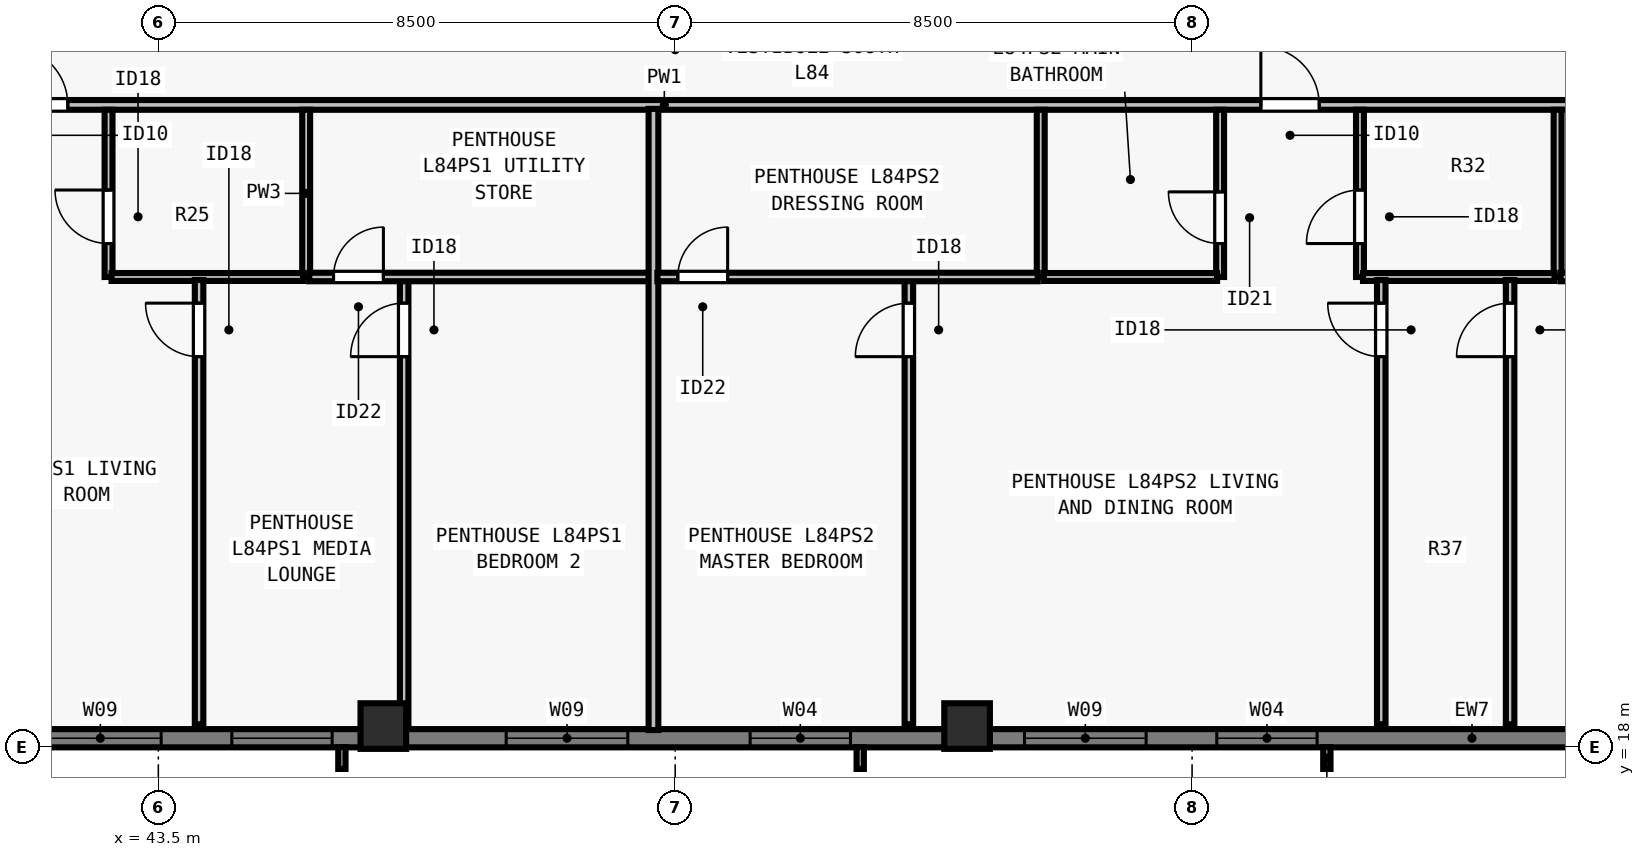
"""IFC4 building model, lengths in metres.
Left out: names, types, materials, properties, quantities, classifications, styles, units other than length and angle.
Written with IfcOpenShell. Run it as: python <this file> out.ifc"""

import sys

from ifc_helpers import new_model, si_unit, direction, frame, frame_2d, origin, origin_2d, place, context, subcontext, project, spatial, rectangle, extrude, element, fill, save


model = new_model("IFC4")
c1 = context("Model", 3, precision=1e-05, world=origin(), true_north=direction((0.0, 1.0)))
c2 = subcontext(c1, "Body", "Model", "MODEL_VIEW")
j1 = project(units=[si_unit("LENGTHUNIT", "METRE"), si_unit("PLANEANGLEUNIT", "RADIAN")], contexts=[c1])
p1 = place(None, origin())
s1 = spatial("IfcSite", under=j1, at=p1, CompositionType="ELEMENT")
p2 = place(p1, origin())
s2 = spatial("IfcBuilding", under=s1, at=p2, CompositionType="ELEMENT")
p3 = place(p2, frame((0.0, 0.0, 305.0)))
s3 = spatial("IfcBuildingStorey", under=s2, at=p3, CompositionType="ELEMENT", Elevation=305.0)
for number, where, z_axis, x_axis in (
    (1, (47.2, 18.35, 0.0), (0.0, 0.0, 1.0), (1.0, 0.0, 0.0)),
    (2, (56.8, 18.35, 0.0), (0.0, 0.0, 1.0), (1.0, 0.0, 0.0)),
):
    element("IfcColumn", number, at=place(p3, frame(where, z_axis=z_axis, x_axis=x_axis)), inside=s3, PredefinedType="COLUMN", context=c2, shape_type="SweptSolid", body=[
        extrude(rectangle(XDim=0.75, YDim=0.75, at=origin_2d()), origin(), (0.0, 0.0, 1.0), 3.5),
    ])
p4 = place(p3, frame((67.5, 18.15, 0.0), z_axis=(0.0, 0.0, 1.0), x_axis=(-1.0, 0.0, 0.0)))
e3 = element("IfcWall", 3, at=p4, inside=s3, PredefinedType="SOLIDWALL", context=c2, shape_type="SweptSolid", body=[
    extrude(rectangle(XDim=30.722, YDim=0.3, at=frame_2d((15.361, 0.0))), origin(), (0.0, 0.0, 1.0), 3.29),
])
p5 = place(p4, frame((4.944, 0.0, 0.8)))
e4 = element("IfcOpeningElement", 4, at=p5, cuts=e3, PredefinedType="OPENING", context=c2, shape_type="SweptSolid", body=[
    extrude(rectangle(XDim=1.65, YDim=1.758, at=frame_2d((0.825, 0.879))), frame((0.0, 0.16, 0.0), z_axis=(0.0, -1.0, 0.0), x_axis=(1.0, 0.0, 0.0)), (0.0, 0.0, 1.0), 0.32),
])
p6 = place(p4, frame((7.756, 0.0, 0.8)))
e5 = element("IfcOpeningElement", 5, at=p6, cuts=e3, PredefinedType="OPENING", context=c2, shape_type="SweptSolid", body=[
    extrude(rectangle(XDim=2.0, YDim=1.758, at=frame_2d((1.0, 0.879))), frame((0.0, 0.16, 0.0), z_axis=(0.0, -1.0, 0.0), x_axis=(1.0, 0.0, 0.0)), (0.0, 0.0, 1.0), 0.32),
])
p7 = place(p4, frame((12.617, 0.0, 0.8)))
e6 = element("IfcOpeningElement", 6, at=p7, cuts=e3, PredefinedType="OPENING", context=c2, shape_type="SweptSolid", body=[
    extrude(rectangle(XDim=1.65, YDim=1.758, at=frame_2d((0.825, 0.879))), frame((0.0, 0.16, 0.0), z_axis=(0.0, -1.0, 0.0), x_axis=(1.0, 0.0, 0.0)), (0.0, 0.0, 1.0), 0.32),
])
p8 = place(p4, frame((16.28, 0.0, 0.8)))
e7 = element("IfcOpeningElement", 7, at=p8, cuts=e3, PredefinedType="OPENING", context=c2, shape_type="SweptSolid", body=[
    extrude(rectangle(XDim=2.0, YDim=1.758, at=frame_2d((1.0, 0.879))), frame((0.0, 0.16, 0.0), z_axis=(0.0, -1.0, 0.0), x_axis=(1.0, 0.0, 0.0)), (0.0, 0.0, 1.0), 0.32),
])
p9 = place(p4, frame((21.142, 0.0, 0.8)))
e8 = element("IfcOpeningElement", 8, at=p9, cuts=e3, PredefinedType="OPENING", context=c2, shape_type="SweptSolid", body=[
    extrude(rectangle(XDim=1.65, YDim=1.758, at=frame_2d((0.825, 0.879))), frame((0.0, 0.16, 0.0), z_axis=(0.0, -1.0, 0.0), x_axis=(1.0, 0.0, 0.0)), (0.0, 0.0, 1.0), 0.32),
])
p10 = place(p4, frame((23.954, 0.0, 0.8)))
e9 = element("IfcOpeningElement", 9, at=p10, cuts=e3, PredefinedType="OPENING", context=c2, shape_type="SweptSolid", body=[
    extrude(rectangle(XDim=2.0, YDim=1.758, at=frame_2d((1.0, 0.879))), frame((0.0, 0.16, 0.0), z_axis=(0.0, -1.0, 0.0), x_axis=(1.0, 0.0, 0.0)), (0.0, 0.0, 1.0), 0.32),
])
p11 = place(p3, frame((31.285, 28.565, 0.0), z_axis=(0.0, 0.0, 1.0), x_axis=(1.0, 0.0, 0.0)))
e10 = element("IfcWall", 10, at=p11, inside=s3, PredefinedType="PARTITIONING", context=c2, shape_type="SweptSolid", body=[
    extrude(rectangle(XDim=41.43, YDim=0.16, at=frame_2d((20.715, 0.0))), origin(), (0.0, 0.0, 1.0), 3.009),
])
p12 = place(p11, frame((9.766, 0.0, 0.0)))
e11 = element("IfcOpeningElement", 11, at=p12, cuts=e10, PredefinedType="OPENING", context=c2, shape_type="SweptSolid", body=[
    extrude(rectangle(XDim=0.96, YDim=2.18, at=frame_2d((0.48, 1.09))), frame((0.0, 0.09, 0.0), z_axis=(0.0, -1.0, 0.0), x_axis=(1.0, 0.0, 0.0)), (0.0, 0.0, 1.0), 0.18),
])
p13 = place(p11, frame((30.346, 0.0, 0.0)))
e12 = element("IfcOpeningElement", 12, at=p13, cuts=e10, PredefinedType="OPENING", context=c2, shape_type="SweptSolid", body=[
    extrude(rectangle(XDim=0.96, YDim=2.18, at=frame_2d((0.48, 1.09))), frame((0.0, 0.09, 0.0), z_axis=(0.0, -1.0, 0.0), x_axis=(1.0, 0.0, 0.0)), (0.0, 0.0, 1.0), 0.18),
])
p14 = place(p3, frame((45.931, 25.735, 0.0), z_axis=(0.0, 0.0, 1.0), x_axis=(0.0, 1.0, 0.0)))
e13 = element("IfcWall", 13, at=p14, inside=s3, PredefinedType="PLUMBINGWALL", context=c2, shape_type="SweptSolid", body=[
    extrude(rectangle(XDim=2.75, YDim=0.13, at=frame_2d((1.375, 0.0))), origin(), (0.0, 0.0, 1.0), 3.29),
])
p15 = place(p3, frame((42.681, 25.735, 0.0), z_axis=(0.0, 0.0, 1.0), x_axis=(0.0, 1.0, 0.0)))
e14 = element("IfcWall", 14, at=p15, inside=s3, PredefinedType="PLUMBINGWALL", context=c2, shape_type="SweptSolid", body=[
    extrude(rectangle(XDim=2.75, YDim=0.13, at=frame_2d((1.375, 0.0))), origin(), (0.0, 0.0, 1.0), 3.29),
])
p16 = place(p15, frame((0.55, 0.0, 0.0)))
e15 = element("IfcOpeningElement", 15, at=p16, cuts=e14, PredefinedType="OPENING", context=c2, shape_type="SweptSolid", body=[
    extrude(rectangle(XDim=0.88, YDim=2.1, at=frame_2d((0.44, 1.05))), frame((0.0, 0.075, 0.0), z_axis=(0.0, -1.0, 0.0), x_axis=(1.0, 0.0, 0.0)), (0.0, 0.0, 1.0), 0.15),
])
p17 = place(p3, frame((42.731, 25.735, 0.0), z_axis=(0.0, 0.0, 1.0), x_axis=(1.0, 0.0, 0.0)))
e16 = element("IfcWall", 16, at=p17, inside=s3, PredefinedType="PLUMBINGWALL", context=c2, shape_type="SweptSolid", body=[
    extrude(rectangle(XDim=3.15, YDim=0.13, at=frame_2d((1.575, 0.0))), origin(), (0.0, 0.0, 1.0), 3.29),
])
p18 = place(p3, frame((47.542, 18.38, 0.0), z_axis=(0.0, 0.0, 1.0), x_axis=(0.0, 1.0, 0.0)))
e17 = element("IfcWall", 17, at=p18, inside=s3, PredefinedType="PARTITIONING", context=c2, shape_type="SweptSolid", body=[
    extrude(rectangle(XDim=7.395, YDim=0.14, at=frame_2d((3.698, 0.0))), origin(), (0.0, 0.0, 1.0), 3.009),
])
p19 = place(p18, frame((6.045, 0.0, 0.0)))
e18 = element("IfcOpeningElement", 18, at=p19, cuts=e17, PredefinedType="OPENING", context=c2, shape_type="SweptSolid", body=[
    extrude(rectangle(XDim=0.88, YDim=2.1, at=frame_2d((0.44, 1.05))), frame((0.0, 0.08, 0.0), z_axis=(0.0, -1.0, 0.0), x_axis=(1.0, 0.0, 0.0)), (0.0, 0.0, 1.0), 0.16),
])
p20 = place(p3, frame((45.981, 25.735, 0.0), z_axis=(0.0, 0.0, 1.0), x_axis=(1.0, 0.0, 0.0)))
e19 = element("IfcWall", 19, at=p20, inside=s3, PredefinedType="PARTITIONING", context=c2, shape_type="SweptSolid", body=[
    extrude(rectangle(XDim=5.711, YDim=0.14, at=frame_2d((2.855, 0.0))), origin(), (0.0, 0.0, 1.0), 3.29),
])
p21 = place(p20, frame((0.4, 0.0, 0.0)))
e20 = element("IfcOpeningElement", 20, at=p21, cuts=e19, PredefinedType="OPENING", context=c2, shape_type="SweptSolid", body=[
    extrude(rectangle(XDim=0.82, YDim=2.1, at=frame_2d((0.41, 1.05))), frame((0.0, 0.08, 0.0), z_axis=(0.0, -1.0, 0.0), x_axis=(1.0, 0.0, 0.0)), (0.0, 0.0, 1.0), 0.16),
])
p22 = place(p3, frame((44.17, 18.38, 0.0), z_axis=(0.0, 0.0, 1.0), x_axis=(0.0, 1.0, 0.0)))
e21 = element("IfcWall", 21, at=p22, inside=s3, PredefinedType="PARTITIONING", context=c2, shape_type="SweptSolid", body=[
    extrude(rectangle(XDim=7.305, YDim=0.14, at=frame_2d((3.653, 0.0))), origin(), (0.0, 0.0, 1.0), 3.29),
])
p23 = place(p22, frame((6.045, 0.0, 0.0)))
e22 = element("IfcOpeningElement", 22, at=p23, cuts=e21, PredefinedType="OPENING", context=c2, shape_type="SweptSolid", body=[
    extrude(rectangle(XDim=0.88, YDim=2.1, at=frame_2d((0.44, 1.05))), frame((0.0, 0.08, 0.0), z_axis=(0.0, -1.0, 0.0), x_axis=(1.0, 0.0, 0.0)), (0.0, 0.0, 1.0), 0.16),
])
p24 = place(p3, frame((51.643, 18.285, 0.0), z_axis=(0.0, 0.0, 1.0), x_axis=(0.0, 1.0, 0.0)))
e23 = element("IfcWall", 23, at=p24, inside=s3, PredefinedType="PARTITIONING", context=c2, shape_type="SweptSolid", body=[
    extrude(rectangle(XDim=10.215, YDim=0.16, at=frame_2d((5.107, 0.0))), origin(), (0.0, 0.0, 1.0), 3.009),
])
p25 = place(p3, frame((58.011, 25.735, 0.0), z_axis=(0.0, 0.0, 1.0), x_axis=(0.0, 1.0, 0.0)))
e24 = element("IfcWall", 24, at=p25, inside=s3, PredefinedType="PLUMBINGWALL", context=c2, shape_type="SweptSolid", body=[
    extrude(rectangle(XDim=2.75, YDim=0.13, at=frame_2d((1.375, 0.0))), origin(), (0.0, 0.0, 1.0), 3.29),
])
p26 = place(p3, frame((60.961, 25.735, 0.0), z_axis=(0.0, 0.0, 1.0), x_axis=(0.0, 1.0, 0.0)))
e25 = element("IfcWall", 25, at=p26, inside=s3, PredefinedType="PLUMBINGWALL", context=c2, shape_type="SweptSolid", body=[
    extrude(rectangle(XDim=2.75, YDim=0.13, at=frame_2d((1.375, 0.0))), origin(), (0.0, 0.0, 1.0), 3.29),
])
p27 = place(p26, frame((0.55, 0.0, 0.0)))
e26 = element("IfcOpeningElement", 26, at=p27, cuts=e25, PredefinedType="OPENING", context=c2, shape_type="SweptSolid", body=[
    extrude(rectangle(XDim=0.85, YDim=2.08, at=frame_2d((0.425, 1.04))), frame((0.0, 0.075, 0.0), z_axis=(0.0, -1.0, 0.0), x_axis=(1.0, 0.0, 0.0)), (0.0, 0.0, 1.0), 0.15),
])
p28 = place(p3, frame((58.061, 25.735, 0.0), z_axis=(0.0, 0.0, 1.0), x_axis=(1.0, 0.0, 0.0)))
e27 = element("IfcWall", 27, at=p28, inside=s3, PredefinedType="PLUMBINGWALL", context=c2, shape_type="SweptSolid", body=[
    extrude(rectangle(XDim=2.85, YDim=0.13, at=frame_2d((1.425, 0.0))), origin(), (0.0, 0.0, 1.0), 3.29),
])
p29 = place(p3, frame((66.511, 25.735, 0.0), z_axis=(0.0, 0.0, 1.0), x_axis=(0.0, 1.0, 0.0)))
e28 = element("IfcWall", 28, at=p29, inside=s3, PredefinedType="PLUMBINGWALL", context=c2, shape_type="SweptSolid", body=[
    extrude(rectangle(XDim=2.75, YDim=0.13, at=frame_2d((1.375, 0.0))), origin(), (0.0, 0.0, 1.0), 3.29),
])
p30 = place(p3, frame((63.261, 25.735, 0.0), z_axis=(0.0, 0.0, 1.0), x_axis=(0.0, 1.0, 0.0)))
e29 = element("IfcWall", 29, at=p30, inside=s3, PredefinedType="PLUMBINGWALL", context=c2, shape_type="SweptSolid", body=[
    extrude(rectangle(XDim=2.75, YDim=0.13, at=frame_2d((1.375, 0.0))), origin(), (0.0, 0.0, 1.0), 3.29),
])
p31 = place(p30, frame((0.55, 0.0, 0.0)))
e30 = element("IfcOpeningElement", 30, at=p31, cuts=e29, PredefinedType="OPENING", context=c2, shape_type="SweptSolid", body=[
    extrude(rectangle(XDim=0.88, YDim=2.1, at=frame_2d((0.44, 1.05))), frame((0.0, 0.075, 0.0), z_axis=(0.0, -1.0, 0.0), x_axis=(1.0, 0.0, 0.0)), (0.0, 0.0, 1.0), 0.15),
])
p32 = place(p3, frame((63.311, 25.735, 0.0), z_axis=(0.0, 0.0, 1.0), x_axis=(1.0, 0.0, 0.0)))
e31 = element("IfcWall", 31, at=p32, inside=s3, PredefinedType="PLUMBINGWALL", context=c2, shape_type="SweptSolid", body=[
    extrude(rectangle(XDim=3.15, YDim=0.13, at=frame_2d((1.575, 0.0))), origin(), (0.0, 0.0, 1.0), 3.29),
])
p33 = place(p3, frame((55.843, 18.38, 0.0), z_axis=(0.0, 0.0, 1.0), x_axis=(0.0, 1.0, 0.0)))
e32 = element("IfcWall", 32, at=p33, inside=s3, PredefinedType="PARTITIONING", context=c2, shape_type="SweptSolid", body=[
    extrude(rectangle(XDim=7.395, YDim=0.14, at=frame_2d((3.698, 0.0))), origin(), (0.0, 0.0, 1.0), 3.29),
])
p34 = place(p33, frame((6.045, 0.0, 0.0)))
e33 = element("IfcOpeningElement", 33, at=p34, cuts=e32, PredefinedType="OPENING", context=c2, shape_type="SweptSolid", body=[
    extrude(rectangle(XDim=0.88, YDim=2.1, at=frame_2d((0.44, 1.05))), frame((0.0, 0.08, 0.0), z_axis=(0.0, -1.0, 0.0), x_axis=(1.0, 0.0, 0.0)), (0.0, 0.0, 1.0), 0.16),
])
p35 = place(p3, frame((51.708, 25.735, 0.0), z_axis=(0.0, 0.0, 1.0), x_axis=(1.0, 0.0, 0.0)))
e34 = element("IfcWall", 34, at=p35, inside=s3, PredefinedType="PARTITIONING", context=c2, shape_type="SweptSolid", body=[
    extrude(rectangle(XDim=6.254, YDim=0.14, at=frame_2d((3.127, 0.0))), origin(), (0.0, 0.0, 1.0), 3.29),
])
p36 = place(p35, frame((0.335, 0.0, 0.0)))
e35 = element("IfcOpeningElement", 35, at=p36, cuts=e34, PredefinedType="OPENING", context=c2, shape_type="SweptSolid", body=[
    extrude(rectangle(XDim=0.82, YDim=2.1, at=frame_2d((0.41, 1.05))), frame((0.0, 0.08, 0.0), z_axis=(0.0, -1.0, 0.0), x_axis=(1.0, 0.0, 0.0)), (0.0, 0.0, 1.0), 0.16),
])
p37 = place(p3, frame((65.73, 18.38, 0.0), z_axis=(0.0, 0.0, 1.0), x_axis=(0.0, 1.0, 0.0)))
e36 = element("IfcWall", 36, at=p37, inside=s3, PredefinedType="PARTITIONING", context=c2, shape_type="SweptSolid", body=[
    extrude(rectangle(XDim=7.305, YDim=0.14, at=frame_2d((3.653, 0.0))), origin(), (0.0, 0.0, 1.0), 2.653),
])
p38 = place(p37, frame((6.045, 0.0, 0.0)))
e37 = element("IfcOpeningElement", 37, at=p38, cuts=e36, PredefinedType="OPENING", context=c2, shape_type="SweptSolid", body=[
    extrude(rectangle(XDim=0.88, YDim=2.1, at=frame_2d((0.44, 1.05))), frame((0.0, 0.08, 0.0), z_axis=(0.0, -1.0, 0.0), x_axis=(1.0, 0.0, 0.0)), (0.0, 0.0, 1.0), 0.16),
])
p39 = place(p3, frame((66.561, 25.735, 0.0), z_axis=(0.0, 0.0, 1.0), x_axis=(1.0, 0.0, 0.0)))
e38 = element("IfcWall", 38, at=p39, inside=s3, PredefinedType="PARTITIONING", context=c2, shape_type="SweptSolid", body=[
    extrude(rectangle(XDim=6.069, YDim=0.14, at=frame_2d((3.034, 0.0))), origin(), (0.0, 0.0, 1.0), 3.009),
])
p40 = place(p39, frame((0.4, 0.0, 0.0)))
e39 = element("IfcOpeningElement", 39, at=p40, cuts=e38, PredefinedType="OPENING", context=c2, shape_type="SweptSolid", body=[
    extrude(rectangle(XDim=0.82, YDim=2.1, at=frame_2d((0.41, 1.05))), frame((0.0, 0.08, 0.0), z_axis=(0.0, -1.0, 0.0), x_axis=(1.0, 0.0, 0.0)), (0.0, 0.0, 1.0), 0.16),
])
p41 = place(p3, frame((63.611, 18.38, 0.0), z_axis=(0.0, 0.0, 1.0), x_axis=(0.0, 1.0, 0.0)))
e40 = element("IfcWall", 40, at=p41, inside=s3, PredefinedType="PARTITIONING", context=c2, shape_type="SweptSolid", body=[
    extrude(rectangle(XDim=7.305, YDim=0.14, at=frame_2d((3.653, 0.0))), origin(), (0.0, 0.0, 1.0), 2.653),
])
p42 = place(p41, frame((6.045, 0.0, 0.0)))
e41 = element("IfcOpeningElement", 41, at=p42, cuts=e40, PredefinedType="OPENING", context=c2, shape_type="SweptSolid", body=[
    extrude(rectangle(XDim=0.88, YDim=2.1, at=frame_2d((0.44, 1.05))), frame((0.0, 0.08, 0.0), z_axis=(0.0, -1.0, 0.0), x_axis=(1.0, 0.0, 0.0)), (0.0, 0.0, 1.0), 0.16),
])
p43 = place(p5, origin())
e42 = element("IfcWindow", 42, at=p43, inside=s3, PartitioningType="SINGLE_PANEL", PredefinedType="WINDOW", context=c2, shape_type="SweptSolid", body=[
    extrude(rectangle(XDim=1.65, YDim=1.758, at=frame_2d((0.825, 0.879))), frame((0.0, -0.05, 0.0), z_axis=(0.0, -1.0, 0.0), x_axis=(1.0, 0.0, 0.0)), (0.0, 0.0, 1.0), 0.06),
])
fill(e4, e42)
p44 = place(p6, origin())
e43 = element("IfcWindow", 43, at=p44, inside=s3, PartitioningType="SINGLE_PANEL", PredefinedType="WINDOW", context=c2, shape_type="SweptSolid", body=[
    extrude(rectangle(XDim=2.0, YDim=1.758, at=frame_2d((1.0, 0.879))), frame((0.0, -0.05, 0.0), z_axis=(0.0, -1.0, 0.0), x_axis=(1.0, 0.0, 0.0)), (0.0, 0.0, 1.0), 0.06),
])
fill(e5, e43)
p45 = place(p7, origin())
e44 = element("IfcWindow", 44, at=p45, inside=s3, PartitioningType="SINGLE_PANEL", PredefinedType="WINDOW", context=c2, shape_type="SweptSolid", body=[
    extrude(rectangle(XDim=1.65, YDim=1.758, at=frame_2d((0.825, 0.879))), frame((0.0, -0.05, 0.0), z_axis=(0.0, -1.0, 0.0), x_axis=(1.0, 0.0, 0.0)), (0.0, 0.0, 1.0), 0.06),
])
fill(e6, e44)
p46 = place(p8, origin())
e45 = element("IfcWindow", 45, at=p46, inside=s3, PartitioningType="SINGLE_PANEL", PredefinedType="WINDOW", context=c2, shape_type="SweptSolid", body=[
    extrude(rectangle(XDim=2.0, YDim=1.758, at=frame_2d((1.0, 0.879))), frame((0.0, -0.05, 0.0), z_axis=(0.0, -1.0, 0.0), x_axis=(1.0, 0.0, 0.0)), (0.0, 0.0, 1.0), 0.06),
])
fill(e7, e45)
p47 = place(p9, origin())
e46 = element("IfcWindow", 46, at=p47, inside=s3, PartitioningType="SINGLE_PANEL", PredefinedType="WINDOW", context=c2, shape_type="SweptSolid", body=[
    extrude(rectangle(XDim=1.65, YDim=1.758, at=frame_2d((0.825, 0.879))), frame((0.0, -0.05, 0.0), z_axis=(0.0, -1.0, 0.0), x_axis=(1.0, 0.0, 0.0)), (0.0, 0.0, 1.0), 0.06),
])
fill(e8, e46)
p48 = place(p10, origin())
e47 = element("IfcWindow", 47, at=p48, inside=s3, PartitioningType="SINGLE_PANEL", PredefinedType="WINDOW", context=c2, shape_type="SweptSolid", body=[
    extrude(rectangle(XDim=2.0, YDim=1.758, at=frame_2d((1.0, 0.879))), frame((0.0, -0.05, 0.0), z_axis=(0.0, -1.0, 0.0), x_axis=(1.0, 0.0, 0.0)), (0.0, 0.0, 1.0), 0.06),
])
fill(e9, e47)
p49 = place(p16, origin())
e48 = element("IfcDoor", 48, at=p49, inside=s3, OperationType="SINGLE_SWING_RIGHT", PredefinedType="DOOR", context=c2, shape_type="SweptSolid", body=[
    extrude(rectangle(XDim=0.88, YDim=2.1, at=frame_2d((0.44, 1.05))), frame((0.0, 0.025, 0.0), z_axis=(0.0, -1.0, 0.0), x_axis=(1.0, 0.0, 0.0)), (0.0, 0.0, 1.0), 0.05),
])
fill(e15, e48)
p50 = place(p21, origin())
e49 = element("IfcDoor", 49, at=p50, inside=s3, OperationType="SINGLE_SWING_RIGHT", PredefinedType="DOOR", context=c2, shape_type="SweptSolid", body=[
    extrude(rectangle(XDim=0.82, YDim=2.1, at=frame_2d((0.41, 1.05))), frame((0.0, 0.025, 0.0), z_axis=(0.0, -1.0, 0.0), x_axis=(1.0, 0.0, 0.0)), (0.0, 0.0, 1.0), 0.05),
])
fill(e20, e49)
p51 = place(p19, origin())
e50 = element("IfcDoor", 50, at=p51, inside=s3, OperationType="SINGLE_SWING_LEFT", PredefinedType="DOOR", context=c2, shape_type="SweptSolid", body=[
    extrude(rectangle(XDim=0.88, YDim=2.1, at=frame_2d((0.44, 1.05))), frame((0.0, 0.025, 0.0), z_axis=(0.0, -1.0, 0.0), x_axis=(1.0, 0.0, 0.0)), (0.0, 0.0, 1.0), 0.05),
])
fill(e18, e50)
p52 = place(p23, origin())
e51 = element("IfcDoor", 51, at=p52, inside=s3, OperationType="SINGLE_SWING_RIGHT", PredefinedType="DOOR", context=c2, shape_type="SweptSolid", body=[
    extrude(rectangle(XDim=0.88, YDim=2.1, at=frame_2d((0.44, 1.05))), frame((0.0, 0.025, 0.0), z_axis=(0.0, -1.0, 0.0), x_axis=(1.0, 0.0, 0.0)), (0.0, 0.0, 1.0), 0.05),
])
fill(e22, e51)
p53 = place(p12, origin())
e52 = element("IfcDoor", 52, at=p53, inside=s3, OperationType="SINGLE_SWING_LEFT", PredefinedType="DOOR", context=c2, shape_type="SweptSolid", body=[
    extrude(rectangle(XDim=0.96, YDim=2.18, at=frame_2d((0.48, 1.09))), frame((0.0, 0.025, 0.0), z_axis=(0.0, -1.0, 0.0), x_axis=(1.0, 0.0, 0.0)), (0.0, 0.0, 1.0), 0.05),
])
fill(e11, e52)
p54 = place(p27, origin())
e53 = element("IfcDoor", 53, at=p54, inside=s3, OperationType="SINGLE_SWING_RIGHT", PredefinedType="DOOR", context=c2, shape_type="SweptSolid", body=[
    extrude(rectangle(XDim=0.85, YDim=2.08, at=frame_2d((0.425, 1.04))), frame((0.0, 0.025, 0.0), z_axis=(0.0, -1.0, 0.0), x_axis=(1.0, 0.0, 0.0)), (0.0, 0.0, 1.0), 0.05),
])
fill(e26, e53)
p55 = place(p31, origin())
e54 = element("IfcDoor", 54, at=p55, inside=s3, OperationType="SINGLE_SWING_LEFT", PredefinedType="DOOR", context=c2, shape_type="SweptSolid", body=[
    extrude(rectangle(XDim=0.88, YDim=2.1, at=frame_2d((0.44, 1.05))), frame((0.0, 0.025, 0.0), z_axis=(0.0, -1.0, 0.0), x_axis=(1.0, 0.0, 0.0)), (0.0, 0.0, 1.0), 0.05),
])
fill(e30, e54)
p56 = place(p36, origin())
e55 = element("IfcDoor", 55, at=p56, inside=s3, OperationType="SINGLE_SWING_RIGHT", PredefinedType="DOOR", context=c2, shape_type="SweptSolid", body=[
    extrude(rectangle(XDim=0.82, YDim=2.1, at=frame_2d((0.41, 1.05))), frame((0.0, 0.025, 0.0), z_axis=(0.0, -1.0, 0.0), x_axis=(1.0, 0.0, 0.0)), (0.0, 0.0, 1.0), 0.05),
])
fill(e35, e55)
p57 = place(p34, origin())
e56 = element("IfcDoor", 56, at=p57, inside=s3, OperationType="SINGLE_SWING_LEFT", PredefinedType="DOOR", context=c2, shape_type="SweptSolid", body=[
    extrude(rectangle(XDim=0.88, YDim=2.1, at=frame_2d((0.44, 1.05))), frame((0.0, 0.025, 0.0), z_axis=(0.0, -1.0, 0.0), x_axis=(1.0, 0.0, 0.0)), (0.0, 0.0, 1.0), 0.05),
])
fill(e33, e56)
p58 = place(p38, origin())
e57 = element("IfcDoor", 57, at=p58, inside=s3, OperationType="SINGLE_SWING_LEFT", PredefinedType="DOOR", context=c2, shape_type="SweptSolid", body=[
    extrude(rectangle(XDim=0.88, YDim=2.1, at=frame_2d((0.44, 1.05))), frame((0.0, 0.025, 0.0), z_axis=(0.0, -1.0, 0.0), x_axis=(1.0, 0.0, 0.0)), (0.0, 0.0, 1.0), 0.05),
])
fill(e37, e57)
p59 = place(p42, origin())
e58 = element("IfcDoor", 58, at=p59, inside=s3, OperationType="SINGLE_SWING_RIGHT", PredefinedType="DOOR", context=c2, shape_type="SweptSolid", body=[
    extrude(rectangle(XDim=0.88, YDim=2.1, at=frame_2d((0.44, 1.05))), frame((0.0, 0.025, 0.0), z_axis=(0.0, -1.0, 0.0), x_axis=(1.0, 0.0, 0.0)), (0.0, 0.0, 1.0), 0.05),
])
fill(e41, e58)
p60 = place(p13, origin())
e59 = element("IfcDoor", 59, at=p60, inside=s3, OperationType="SINGLE_SWING_LEFT", PredefinedType="DOOR", context=c2, shape_type="SweptSolid", body=[
    extrude(rectangle(XDim=0.96, YDim=2.18, at=frame_2d((0.48, 1.09))), frame((0.0, 0.025, 0.0), z_axis=(0.0, -1.0, 0.0), x_axis=(1.0, 0.0, 0.0)), (0.0, 0.0, 1.0), 0.05),
])
fill(e12, e59)
save(model, sys.argv[1])
